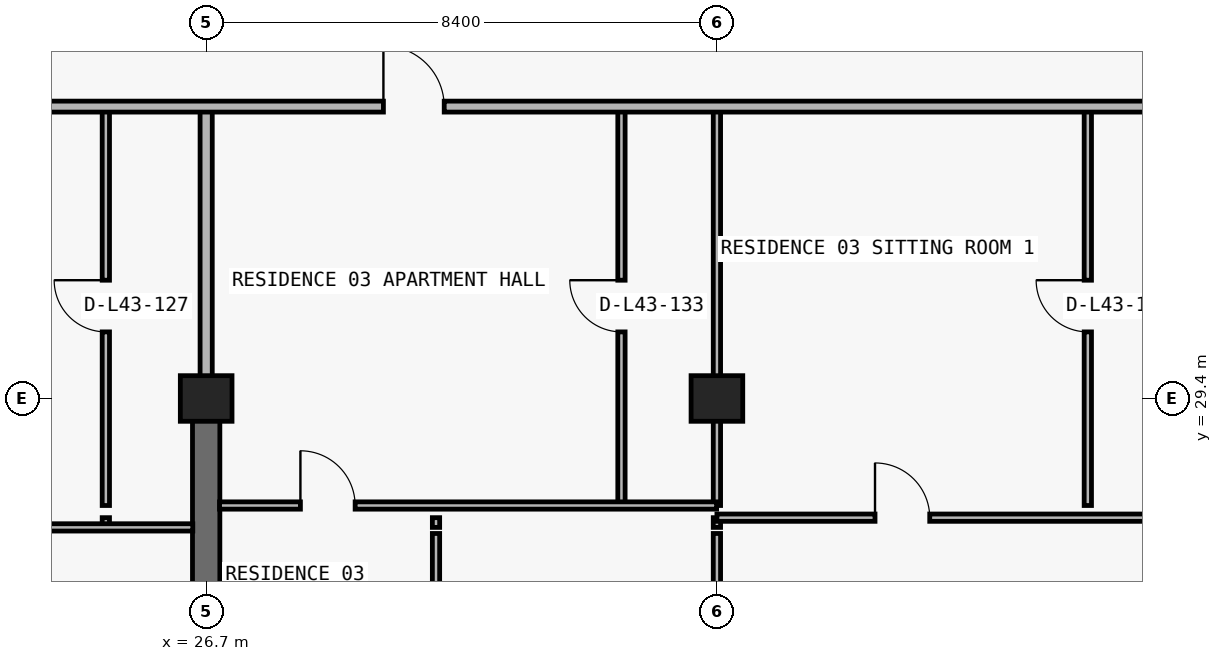
"""IFC4 building model, lengths in metres.
Left out: names, types, materials, properties, quantities, classifications, styles, units other than length and angle.
Written with IfcOpenShell. Run it as: python <this file> out.ifc"""

import sys

from ifc_helpers import new_model, si_unit, direction, frame, frame_2d, origin, origin_2d, place, context, subcontext, project, spatial, rectangle, extrude, element, fill, save


model = new_model("IFC4")
c1 = context("Model", 3, precision=1e-05, world=origin(), true_north=direction((0.0, 1.0)))
c2 = subcontext(c1, "Body", "Model", "MODEL_VIEW")
j1 = project(units=[si_unit("LENGTHUNIT", "METRE"), si_unit("PLANEANGLEUNIT", "RADIAN")], contexts=[c1])
p1 = place(None, origin())
s1 = spatial("IfcSite", under=j1, at=p1, CompositionType="ELEMENT")
p2 = place(p1, origin())
s2 = spatial("IfcBuilding", under=s1, at=p2, CompositionType="ELEMENT")
p3 = place(p2, frame((0.0, 0.0, 157.2)))
s3 = spatial("IfcBuildingStorey", under=s2, at=p3, CompositionType="ELEMENT", Elevation=157.2)
for number, where, z_axis, x_axis in (
    (1, (26.7, 29.4, 0.0), (0.0, 0.0, 1.0), (1.0, 0.0, 0.0)),
    (2, (35.1, 29.4, 0.0), (0.0, 0.0, 1.0), (1.0, 0.0, 0.0)),
):
    element("IfcColumn", number, at=place(p3, frame(where, z_axis=z_axis, x_axis=x_axis)), inside=s3, PredefinedType="COLUMN", context=c2, shape_type="SweptSolid", body=[
        extrude(rectangle(XDim=0.85, YDim=0.75, at=origin_2d()), origin(), (0.0, 0.0, 1.0), 3.05),
    ])
p4 = place(p3, frame((26.7, 20.8, 0.0), z_axis=(0.0, 0.0, 1.0), x_axis=(0.0, 1.0, 0.0)))
e3 = element("IfcWall", 3, at=p4, inside=s3, PredefinedType="SHEAR", context=c2, shape_type="SweptSolid", body=[
    extrude(rectangle(XDim=8.6, YDim=0.45, at=frame_2d((4.3, 0.0))), origin(), (0.0, 0.0, 1.0), 3.05),
])
p5 = place(p3, frame((25.05, 27.28, 0.0), z_axis=(0.0, 0.0, 1.0), x_axis=(0.0, 1.0, 0.0)))
e4 = element("IfcWall", 4, at=p5, inside=s3, PredefinedType="PARTITIONING", context=c2, shape_type="SweptSolid", body=[
    extrude(rectangle(XDim=0.16, YDim=0.12, at=frame_2d((0.08, 0.0))), origin(), (0.0, 0.0, 1.0), 3.05),
])
p6 = place(p3, frame((25.05, 27.64, 0.0), z_axis=(0.0, 0.0, 1.0), x_axis=(0.0, 1.0, 0.0)))
e5 = element("IfcWall", 5, at=p6, inside=s3, PredefinedType="PARTITIONING", context=c2, shape_type="SweptSolid", body=[
    extrude(rectangle(XDim=6.56, YDim=0.12, at=frame_2d((3.28, 0.0))), origin(), (0.0, 0.0, 1.0), 3.05),
])
p7 = place(p6, frame((2.855, 0.0, 0.0)))
e6 = element("IfcOpeningElement", 6, at=p7, cuts=e5, PredefinedType="OPENING", context=c2, shape_type="SweptSolid", body=[
    extrude(rectangle(XDim=0.85, YDim=2.1, at=frame_2d((0.425, 1.05))), frame((0.0, 0.07, 0.0), z_axis=(0.0, -1.0, 0.0), x_axis=(1.0, 0.0, 0.0)), (0.0, 0.0, 1.0), 0.14),
])
p8 = place(p3, frame((26.7, 29.405, 0.0), z_axis=(0.0, 0.0, 1.0), x_axis=(0.0, 1.0, 0.0)))
e7 = element("IfcWall", 7, at=p8, inside=s3, PredefinedType="PARTITIONING", context=c2, shape_type="SweptSolid", body=[
    extrude(rectangle(XDim=4.795, YDim=0.2, at=frame_2d((2.397, 0.0))), origin(), (0.0, 0.0, 1.0), 2.335),
])
p9 = place(p3, frame((30.48, 22.84, 0.0), z_axis=(0.0, 0.0, 1.0), x_axis=(0.0, 1.0, 0.0)))
e8 = element("IfcWall", 8, at=p9, inside=s3, PredefinedType="PARTITIONING", context=c2, shape_type="SweptSolid", body=[
    extrude(rectangle(XDim=4.34, YDim=0.12, at=frame_2d((2.17, 0.0))), origin(), (0.0, 0.0, 1.0), 3.05),
])
p10 = place(p9, frame((1.72, 0.0, 0.0)))
e9 = element("IfcOpeningElement", 9, at=p10, cuts=e8, PredefinedType="OPENING", context=c2, shape_type="SweptSolid", body=[
    extrude(rectangle(XDim=0.9, YDim=2.15, at=frame_2d((0.45, 1.075))), frame((0.0, 0.07, 0.0), z_axis=(0.0, -1.0, 0.0), x_axis=(1.0, 0.0, 0.0)), (0.0, 0.0, 1.0), 0.14),
])
p11 = place(p3, frame((30.48, 27.28, 0.0), z_axis=(0.0, 0.0, 1.0), x_axis=(0.0, 1.0, 0.0)))
e10 = element("IfcWall", 10, at=p11, inside=s3, PredefinedType="PARTITIONING", context=c2, shape_type="SweptSolid", body=[
    extrude(rectangle(XDim=0.16, YDim=0.12, at=frame_2d((0.08, 0.0))), origin(), (0.0, 0.0, 1.0), 3.05),
])
p12 = place(p3, frame((33.53, 27.64, 0.0), z_axis=(0.0, 0.0, 1.0), x_axis=(0.0, 1.0, 0.0)))
e11 = element("IfcWall", 11, at=p12, inside=s3, PredefinedType="PARTITIONING", context=c2, shape_type="SweptSolid", body=[
    extrude(rectangle(XDim=6.56, YDim=0.12, at=frame_2d((3.28, 0.0))), origin(), (0.0, 0.0, 1.0), 3.05),
])
p13 = place(p12, frame((2.855, 0.0, 0.0)))
e12 = element("IfcOpeningElement", 12, at=p13, cuts=e11, PredefinedType="OPENING", context=c2, shape_type="SweptSolid", body=[
    extrude(rectangle(XDim=0.85, YDim=2.1, at=frame_2d((0.425, 1.05))), frame((0.0, 0.07, 0.0), z_axis=(0.0, -1.0, 0.0), x_axis=(1.0, 0.0, 0.0)), (0.0, 0.0, 1.0), 0.14),
])
p14 = place(p3, frame((35.1, 22.43, 0.0), z_axis=(0.0, 0.0, 1.0), x_axis=(0.0, 1.0, 0.0)))
e13 = element("IfcWall", 13, at=p14, inside=s3, PredefinedType="PARTITIONING", context=c2, shape_type="SweptSolid", body=[
    extrude(rectangle(XDim=4.75, YDim=0.12, at=frame_2d((2.375, 0.0))), origin(), (0.0, 0.0, 1.0), 2.263),
])
p15 = place(p14, frame((2.23, 0.0, 0.0)))
e14 = element("IfcOpeningElement", 14, at=p15, cuts=e13, PredefinedType="OPENING", context=c2, shape_type="SweptSolid", body=[
    extrude(rectangle(XDim=0.9, YDim=2.15, at=frame_2d((0.45, 1.075))), frame((0.0, 0.07, 0.0), z_axis=(0.0, -1.0, 0.0), x_axis=(1.0, 0.0, 0.0)), (0.0, 0.0, 1.0), 0.14),
])
p16 = place(p3, frame((35.1, 27.28, 0.0), z_axis=(0.0, 0.0, 1.0), x_axis=(0.0, 1.0, 0.0)))
e15 = element("IfcWall", 15, at=p16, inside=s3, PredefinedType="PARTITIONING", context=c2, shape_type="SweptSolid", body=[
    extrude(rectangle(XDim=0.16, YDim=0.12, at=frame_2d((0.08, 0.0))), origin(), (0.0, 0.0, 1.0), 2.263),
])
p17 = place(p3, frame((35.1, 27.64, 0.0), z_axis=(0.0, 0.0, 1.0), x_axis=(0.0, 1.0, 0.0)))
e16 = element("IfcWall", 16, at=p17, inside=s3, PredefinedType="PARTITIONING", context=c2, shape_type="SweptSolid", body=[
    extrude(rectangle(XDim=6.56, YDim=0.12, at=frame_2d((3.28, 0.0))), origin(), (0.0, 0.0, 1.0), 2.263),
])
p18 = place(p3, frame((41.2, 27.64, 0.0), z_axis=(0.0, 0.0, 1.0), x_axis=(0.0, 1.0, 0.0)))
e17 = element("IfcWall", 17, at=p18, inside=s3, PredefinedType="PARTITIONING", context=c2, shape_type="SweptSolid", body=[
    extrude(rectangle(XDim=6.56, YDim=0.12, at=frame_2d((3.28, 0.0))), origin(), (0.0, 0.0, 1.0), 3.05),
])
p19 = place(p18, frame((2.855, 0.0, 0.0)))
e18 = element("IfcOpeningElement", 18, at=p19, cuts=e17, PredefinedType="OPENING", context=c2, shape_type="SweptSolid", body=[
    extrude(rectangle(XDim=0.85, YDim=2.1, at=frame_2d((0.425, 1.05))), frame((0.0, 0.07, 0.0), z_axis=(0.0, -1.0, 0.0), x_axis=(1.0, 0.0, 0.0)), (0.0, 0.0, 1.0), 0.14),
])
p20 = place(p3, frame((18.3, 27.28, 0.0), z_axis=(0.0, 0.0, 1.0), x_axis=(1.0, 0.0, 0.0)))
e19 = element("IfcWall", 19, at=p20, inside=s3, PredefinedType="PARTITIONING", context=c2, shape_type="SweptSolid", body=[
    extrude(rectangle(XDim=8.18, YDim=0.12, at=frame_2d((4.09, 0.0))), origin(), (0.0, 0.0, 1.0), 3.05),
])
p21 = place(p20, frame((1.943, 0.0, 0.0)))
e20 = element("IfcOpeningElement", 20, at=p21, cuts=e19, PredefinedType="OPENING", context=c2, shape_type="SweptSolid", body=[
    extrude(rectangle(XDim=0.9, YDim=2.15, at=frame_2d((0.45, 1.075))), frame((0.0, 0.07, 0.0), z_axis=(0.0, -1.0, 0.0), x_axis=(1.0, 0.0, 0.0)), (0.0, 0.0, 1.0), 0.14),
])
p22 = place(p3, frame((35.1, 27.44, 0.0), z_axis=(0.0, 0.0, 1.0), x_axis=(1.0, 0.0, 0.0)))
e21 = element("IfcWall", 21, at=p22, inside=s3, PredefinedType="PARTITIONING", context=c2, shape_type="SweptSolid", body=[
    extrude(rectangle(XDim=7.6, YDim=0.12, at=frame_2d((3.8, 0.0))), origin(), (0.0, 0.0, 1.0), 3.05),
])
p23 = place(p22, frame((2.6, 0.0, 0.0)))
e22 = element("IfcOpeningElement", 22, at=p23, cuts=e21, PredefinedType="OPENING", context=c2, shape_type="SweptSolid", body=[
    extrude(rectangle(XDim=0.9, YDim=2.15, at=frame_2d((0.45, 1.075))), frame((0.0, 0.07, 0.0), z_axis=(0.0, -1.0, 0.0), x_axis=(1.0, 0.0, 0.0)), (0.0, 0.0, 1.0), 0.14),
])
p24 = place(p3, frame((26.92, 27.64, 0.0), z_axis=(0.0, 0.0, 1.0), x_axis=(1.0, 0.0, 0.0)))
e23 = element("IfcWall", 23, at=p24, inside=s3, PredefinedType="PARTITIONING", context=c2, shape_type="SweptSolid", body=[
    extrude(rectangle(XDim=8.175, YDim=0.12, at=frame_2d((4.087, 0.0))), origin(), (0.0, 0.0, 1.0), 3.05),
])
p25 = place(p24, frame((1.33, 0.0, 0.0)))
e24 = element("IfcOpeningElement", 24, at=p25, cuts=e23, PredefinedType="OPENING", context=c2, shape_type="SweptSolid", body=[
    extrude(rectangle(XDim=0.9, YDim=2.15, at=frame_2d((0.45, 1.075))), frame((0.0, 0.07, 0.0), z_axis=(0.0, -1.0, 0.0), x_axis=(1.0, 0.0, 0.0)), (0.0, 0.0, 1.0), 0.14),
])
p26 = place(p3, frame((18.3, 34.2, 0.0), z_axis=(0.0, 0.0, 1.0), x_axis=(1.0, 0.0, 0.0)))
e25 = element("IfcWall", 25, at=p26, inside=s3, PredefinedType="PARTITIONING", context=c2, shape_type="SweptSolid", body=[
    extrude(rectangle(XDim=37.586, YDim=0.18, at=frame_2d((18.793, 0.0))), origin(), (0.0, 0.0, 1.0), 3.05),
])
p27 = place(p26, frame((2.875, 0.0, 0.0)))
e26 = element("IfcOpeningElement", 26, at=p27, cuts=e25, PredefinedType="OPENING", context=c2, shape_type="SweptSolid", body=[
    extrude(rectangle(XDim=1.0, YDim=2.2, at=frame_2d((0.5, 1.1))), frame((0.0, 0.1, 0.0), z_axis=(0.0, -1.0, 0.0), x_axis=(1.0, 0.0, 0.0)), (0.0, 0.0, 1.0), 0.2),
])
p28 = place(p26, frame((11.315, 0.0, 0.0)))
e27 = element("IfcOpeningElement", 27, at=p28, cuts=e25, PredefinedType="OPENING", context=c2, shape_type="SweptSolid", body=[
    extrude(rectangle(XDim=1.0, YDim=2.2, at=frame_2d((0.5, 1.1))), frame((0.0, 0.1, 0.0), z_axis=(0.0, -1.0, 0.0), x_axis=(1.0, 0.0, 0.0)), (0.0, 0.0, 1.0), 0.2),
])
p29 = place(p26, frame((27.275, 0.0, 0.0)))
e28 = element("IfcOpeningElement", 28, at=p29, cuts=e25, PredefinedType="OPENING", context=c2, shape_type="SweptSolid", body=[
    extrude(rectangle(XDim=1.0, YDim=2.2, at=frame_2d((0.5, 1.1))), frame((0.0, 0.1, 0.0), z_axis=(0.0, -1.0, 0.0), x_axis=(1.0, 0.0, 0.0)), (0.0, 0.0, 1.0), 0.2),
])
p30 = place(p26, frame((34.693, 0.0, 0.0)))
e29 = element("IfcOpeningElement", 29, at=p30, cuts=e25, PredefinedType="OPENING", context=c2, shape_type="SweptSolid", body=[
    extrude(rectangle(XDim=1.0, YDim=2.2, at=frame_2d((0.5, 1.1))), frame((0.0, 0.1, 0.0), z_axis=(0.0, -1.0, 0.0), x_axis=(1.0, 0.0, 0.0)), (0.0, 0.0, 1.0), 0.2),
])
p31 = place(p7, origin())
e30 = element("IfcDoor", 30, at=p31, inside=s3, OperationType="SINGLE_SWING_RIGHT", PredefinedType="DOOR", context=c2, shape_type="SweptSolid", body=[
    extrude(rectangle(XDim=0.85, YDim=2.1, at=frame_2d((0.425, 1.05))), frame((0.0, 0.025, 0.0), z_axis=(0.0, -1.0, 0.0), x_axis=(1.0, 0.0, 0.0)), (0.0, 0.0, 1.0), 0.05),
])
fill(e6, e30)
p32 = place(p28, origin())
e31 = element("IfcDoor", 31, at=p32, inside=s3, OperationType="SINGLE_SWING_LEFT", PredefinedType="DOOR", context=c2, shape_type="SweptSolid", body=[
    extrude(rectangle(XDim=1.0, YDim=2.2, at=frame_2d((0.5, 1.1))), frame((0.0, 0.025, 0.0), z_axis=(0.0, -1.0, 0.0), x_axis=(1.0, 0.0, 0.0)), (0.0, 0.0, 1.0), 0.05),
])
fill(e27, e31)
p33 = place(p13, origin())
e32 = element("IfcDoor", 32, at=p33, inside=s3, OperationType="SINGLE_SWING_RIGHT", PredefinedType="DOOR", context=c2, shape_type="SweptSolid", body=[
    extrude(rectangle(XDim=0.85, YDim=2.1, at=frame_2d((0.425, 1.05))), frame((0.0, 0.025, 0.0), z_axis=(0.0, -1.0, 0.0), x_axis=(1.0, 0.0, 0.0)), (0.0, 0.0, 1.0), 0.05),
])
fill(e12, e32)
p34 = place(p25, origin())
e33 = element("IfcDoor", 33, at=p34, inside=s3, OperationType="SINGLE_SWING_LEFT", PredefinedType="DOOR", context=c2, shape_type="SweptSolid", body=[
    extrude(rectangle(XDim=0.9, YDim=2.15, at=frame_2d((0.45, 1.075))), frame((0.0, 0.025, 0.0), z_axis=(0.0, -1.0, 0.0), x_axis=(1.0, 0.0, 0.0)), (0.0, 0.0, 1.0), 0.05),
])
fill(e24, e33)
p35 = place(p23, origin())
e34 = element("IfcDoor", 34, at=p35, inside=s3, OperationType="SINGLE_SWING_LEFT", PredefinedType="DOOR", context=c2, shape_type="SweptSolid", body=[
    extrude(rectangle(XDim=0.9, YDim=2.15, at=frame_2d((0.45, 1.075))), frame((0.0, 0.025, 0.0), z_axis=(0.0, -1.0, 0.0), x_axis=(1.0, 0.0, 0.0)), (0.0, 0.0, 1.0), 0.05),
])
fill(e22, e34)
p36 = place(p19, origin())
e35 = element("IfcDoor", 35, at=p36, inside=s3, OperationType="SINGLE_SWING_RIGHT", PredefinedType="DOOR", context=c2, shape_type="SweptSolid", body=[
    extrude(rectangle(XDim=0.85, YDim=2.1, at=frame_2d((0.425, 1.05))), frame((0.0, 0.025, 0.0), z_axis=(0.0, -1.0, 0.0), x_axis=(1.0, 0.0, 0.0)), (0.0, 0.0, 1.0), 0.05),
])
fill(e18, e35)
save(model, sys.argv[1])
